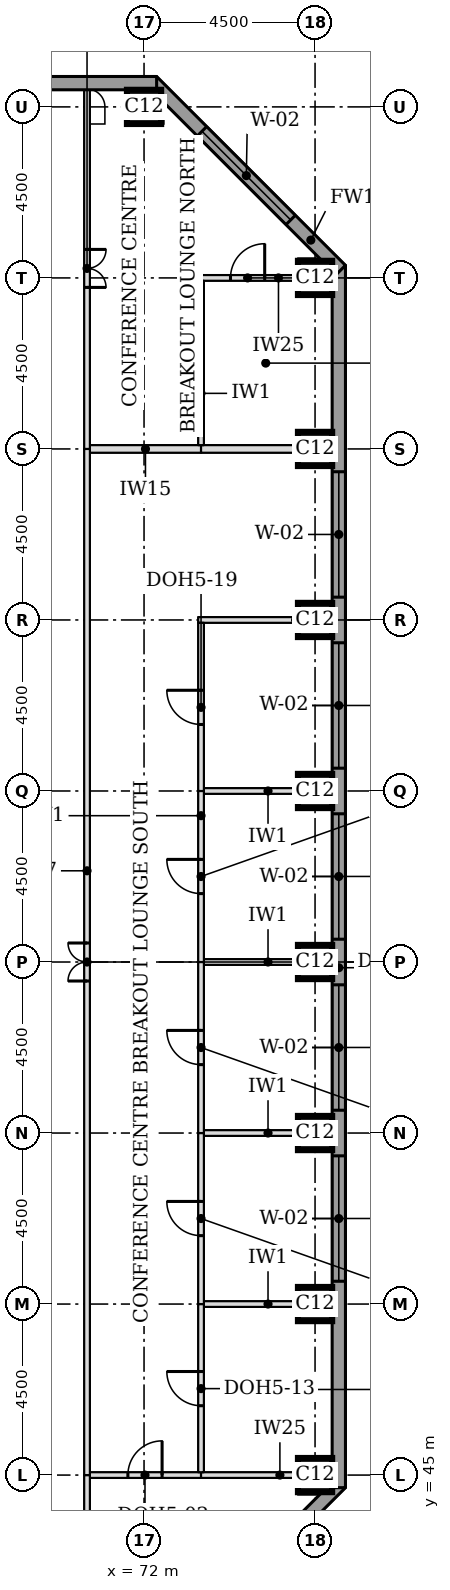
"""IFC4 building model, lengths in metres.
Left out: names, types, materials, properties, quantities, classifications, styles, units other than length and angle.
Written with IfcOpenShell. Run it as: python <this file> out.ifc"""

import sys

from ifc_helpers import new_model, si_unit, direction, frame, frame_2d, origin, origin_2d, place, context, subcontext, project, spatial, rectangle, extrude, element, fill, save


model = new_model("IFC4")
c1 = context("Model", 3, precision=1e-05, world=origin(), true_north=direction((0.0, 1.0)))
c2 = subcontext(c1, "Body", "Model", "MODEL_VIEW")
j1 = project(units=[si_unit("LENGTHUNIT", "METRE"), si_unit("PLANEANGLEUNIT", "RADIAN")], contexts=[c1])
p1 = place(None, origin())
s1 = spatial("IfcSite", under=j1, at=p1, CompositionType="ELEMENT")
p2 = place(p1, origin())
s2 = spatial("IfcBuilding", under=s1, at=p2, CompositionType="ELEMENT")
p3 = place(p2, frame((0.0, 0.0, 177.3)))
s3 = spatial("IfcBuildingStorey", under=s2, at=p3, CompositionType="ELEMENT", Elevation=177.3)
for number, where, z_axis, x_axis in (
    (1, (76.5, 45.0, 0.0), (0.0, 0.0, 1.0), (1.0, 0.0, 0.0)),
    (2, (76.5, 49.5, 0.0), (0.0, 0.0, 1.0), (1.0, 0.0, 0.0)),
    (3, (76.5, 54.0, 0.0), (0.0, 0.0, 1.0), (1.0, 0.0, 0.0)),
    (4, (76.5, 58.5, 0.0), (0.0, 0.0, 1.0), (1.0, 0.0, 0.0)),
    (5, (76.5, 63.0, 0.0), (0.0, 0.0, 1.0), (1.0, 0.0, 0.0)),
    (6, (76.5, 67.5, 0.0), (0.0, 0.0, 1.0), (1.0, 0.0, 0.0)),
    (7, (76.5, 72.0, 0.0), (0.0, 0.0, 1.0), (1.0, 0.0, 0.0)),
    (8, (76.5, 76.5, 0.0), (0.0, 0.0, 1.0), (1.0, 0.0, 0.0)),
    (9, (72.0, 81.0, 0.0), (0.0, 0.0, 1.0), (1.0, 0.0, 0.0)),
):
    element("IfcColumn", number, at=place(p3, frame(where, z_axis=z_axis, x_axis=x_axis)), inside=s3, PredefinedType="COLUMN", context=c2, shape_type="SweptSolid", body=[
        extrude(rectangle(XDim=0.9, YDim=0.9, at=origin_2d()), origin(), (0.0, 0.0, 1.0), 3.7),
    ])
p4 = place(p3, frame((72.208, 39.824, 0.0), z_axis=(0.0, 0.0, 1.0), x_axis=(0.707106781187, 0.707106781187, 0.0)))
e10 = element("IfcWall", 10, at=p4, inside=s3, PredefinedType="STANDARD", context=c2, shape_type="SweptSolid", body=[
    extrude(rectangle(XDim=7.027, YDim=0.35, at=frame_2d((3.513, 0.0))), origin(), (0.0, 0.0, 1.0), 3.525),
])
p5 = place(p4, frame((1.863, 0.0, 0.9)))
e11 = element("IfcOpeningElement", 11, at=p5, cuts=e10, PredefinedType="OPENING", context=c2, shape_type="SweptSolid", body=[
    extrude(rectangle(XDim=3.3, YDim=1.9, at=frame_2d((1.65, 0.95))), frame((0.0, 0.185, 0.0), z_axis=(0.0, -1.0, 0.0), x_axis=(1.0, 0.0, 0.0)), (0.0, 0.0, 1.0), 0.37),
])
p6 = place(p3, frame((77.125, 44.669, 0.0), z_axis=(0.0, 0.0, 1.0), x_axis=(0.0, 1.0, 0.0)))
e12 = element("IfcWall", 12, at=p6, inside=s3, PredefinedType="STANDARD", context=c2, shape_type="SweptSolid", body=[
    extrude(rectangle(XDim=32.163, YDim=0.35, at=frame_2d((16.081, 0.0))), origin(), (0.0, 0.0, 1.0), 3.525),
])
p7 = place(p6, frame((5.431, 0.0, 0.9)))
e13 = element("IfcOpeningElement", 13, at=p7, cuts=e12, PredefinedType="OPENING", context=c2, shape_type="SweptSolid", body=[
    extrude(rectangle(XDim=3.3, YDim=1.9, at=frame_2d((1.65, 0.95))), frame((0.0, 0.185, 0.0), z_axis=(0.0, -1.0, 0.0), x_axis=(1.0, 0.0, 0.0)), (0.0, 0.0, 1.0), 0.37),
])
p8 = place(p6, frame((9.931, 0.0, 0.9)))
e14 = element("IfcOpeningElement", 14, at=p8, cuts=e12, PredefinedType="OPENING", context=c2, shape_type="SweptSolid", body=[
    extrude(rectangle(XDim=3.3, YDim=1.9, at=frame_2d((1.65, 0.95))), frame((0.0, 0.185, 0.0), z_axis=(0.0, -1.0, 0.0), x_axis=(1.0, 0.0, 0.0)), (0.0, 0.0, 1.0), 0.37),
])
p9 = place(p6, frame((14.431, 0.0, 0.9)))
e15 = element("IfcOpeningElement", 15, at=p9, cuts=e12, PredefinedType="OPENING", context=c2, shape_type="SweptSolid", body=[
    extrude(rectangle(XDim=3.3, YDim=1.9, at=frame_2d((1.65, 0.95))), frame((0.0, 0.185, 0.0), z_axis=(0.0, -1.0, 0.0), x_axis=(1.0, 0.0, 0.0)), (0.0, 0.0, 1.0), 0.37),
])
p10 = place(p6, frame((18.931, 0.0, 0.9)))
e16 = element("IfcOpeningElement", 16, at=p10, cuts=e12, PredefinedType="OPENING", context=c2, shape_type="SweptSolid", body=[
    extrude(rectangle(XDim=3.3, YDim=1.9, at=frame_2d((1.65, 0.95))), frame((0.0, 0.185, 0.0), z_axis=(0.0, -1.0, 0.0), x_axis=(1.0, 0.0, 0.0)), (0.0, 0.0, 1.0), 0.37),
])
p11 = place(p6, frame((23.431, 0.0, 0.9)))
e17 = element("IfcOpeningElement", 17, at=p11, cuts=e12, PredefinedType="OPENING", context=c2, shape_type="SweptSolid", body=[
    extrude(rectangle(XDim=3.3, YDim=1.9, at=frame_2d((1.65, 0.95))), frame((0.0, 0.185, 0.0), z_axis=(0.0, -1.0, 0.0), x_axis=(1.0, 0.0, 0.0)), (0.0, 0.0, 1.0), 0.37),
])
p12 = place(p3, frame((77.176, 76.708, 0.0), z_axis=(0.0, 0.0, 1.0), x_axis=(-0.707106781187, 0.707106781187, 0.0)))
e18 = element("IfcWall", 18, at=p12, inside=s3, PredefinedType="STANDARD", context=c2, shape_type="SweptSolid", body=[
    extrude(rectangle(XDim=7.027, YDim=0.35, at=frame_2d((3.513, 0.0))), origin(), (0.0, 0.0, 1.0), 3.525),
])
p13 = place(p12, frame((1.863, 0.0, 0.9)))
e19 = element("IfcOpeningElement", 19, at=p13, cuts=e18, PredefinedType="OPENING", context=c2, shape_type="SweptSolid", body=[
    extrude(rectangle(XDim=3.3, YDim=1.9, at=frame_2d((1.65, 0.95))), frame((0.0, 0.185, 0.0), z_axis=(0.0, -1.0, 0.0), x_axis=(1.0, 0.0, 0.0)), (0.0, 0.0, 1.0), 0.37),
])
p14 = place(p3, frame((72.331, 81.625, 0.0), z_axis=(0.0, 0.0, 1.0), x_axis=(-1.0, 0.0, 0.0)))
e20 = element("IfcWall", 20, at=p14, inside=s3, PredefinedType="STANDARD", context=c2, shape_type="SweptSolid", body=[
    extrude(rectangle(XDim=32.163, YDim=0.35, at=frame_2d((16.081, 0.0))), origin(), (0.0, 0.0, 1.0), 3.525),
])
p15 = place(p14, frame((5.431, 0.0, 0.9)))
e21 = element("IfcOpeningElement", 21, at=p15, cuts=e20, PredefinedType="OPENING", context=c2, shape_type="SweptSolid", body=[
    extrude(rectangle(XDim=3.3, YDim=1.9, at=frame_2d((1.65, 0.95))), frame((0.0, 0.185, 0.0), z_axis=(0.0, -1.0, 0.0), x_axis=(1.0, 0.0, 0.0)), (0.0, 0.0, 1.0), 0.37),
])
p16 = place(p14, frame((9.931, 0.0, 0.9)))
e22 = element("IfcOpeningElement", 22, at=p16, cuts=e20, PredefinedType="OPENING", context=c2, shape_type="SweptSolid", body=[
    extrude(rectangle(XDim=3.3, YDim=1.9, at=frame_2d((1.65, 0.95))), frame((0.0, 0.185, 0.0), z_axis=(0.0, -1.0, 0.0), x_axis=(1.0, 0.0, 0.0)), (0.0, 0.0, 1.0), 0.37),
])
p17 = place(p14, frame((14.431, 0.0, 0.9)))
e23 = element("IfcOpeningElement", 23, at=p17, cuts=e20, PredefinedType="OPENING", context=c2, shape_type="SweptSolid", body=[
    extrude(rectangle(XDim=3.3, YDim=1.9, at=frame_2d((1.65, 0.95))), frame((0.0, 0.185, 0.0), z_axis=(0.0, -1.0, 0.0), x_axis=(1.0, 0.0, 0.0)), (0.0, 0.0, 1.0), 0.37),
])
p18 = place(p14, frame((18.931, 0.0, 0.9)))
e24 = element("IfcOpeningElement", 24, at=p18, cuts=e20, PredefinedType="OPENING", context=c2, shape_type="SweptSolid", body=[
    extrude(rectangle(XDim=3.3, YDim=1.9, at=frame_2d((1.65, 0.95))), frame((0.0, 0.185, 0.0), z_axis=(0.0, -1.0, 0.0), x_axis=(1.0, 0.0, 0.0)), (0.0, 0.0, 1.0), 0.37),
])
p19 = place(p14, frame((23.431, 0.0, 0.9)))
e25 = element("IfcOpeningElement", 25, at=p19, cuts=e20, PredefinedType="OPENING", context=c2, shape_type="SweptSolid", body=[
    extrude(rectangle(XDim=3.3, YDim=1.9, at=frame_2d((1.65, 0.95))), frame((0.0, 0.185, 0.0), z_axis=(0.0, -1.0, 0.0), x_axis=(1.0, 0.0, 0.0)), (0.0, 0.0, 1.0), 0.37),
])
p20 = place(p3, frame((70.575, 45.0, 0.0), z_axis=(0.0, 0.0, 1.0), x_axis=(1.0, 0.0, 0.0)))
e26 = element("IfcWall", 26, at=p20, inside=s3, PredefinedType="PARTITIONING", context=c2, shape_type="SweptSolid", body=[
    extrude(rectangle(XDim=2.925, YDim=0.15, at=frame_2d((1.462, 0.0))), origin(), (0.0, 0.0, 1.0), 3.096),
])
p21 = place(p20, frame((1.0, 0.0, 0.0)))
e27 = element("IfcOpeningElement", 27, at=p21, cuts=e26, PredefinedType="OPENING", context=c2, shape_type="SweptSolid", body=[
    extrude(rectangle(XDim=0.9, YDim=2.1, at=frame_2d((0.45, 1.05))), frame((0.0, 0.085, 0.0), z_axis=(0.0, -1.0, 0.0), x_axis=(1.0, 0.0, 0.0)), (0.0, 0.0, 1.0), 0.17),
])
p22 = place(p3, frame((73.5, 45.0, 0.0), z_axis=(0.0, 0.0, 1.0), x_axis=(1.0, 0.0, 0.0)))
e28 = element("IfcWall", 28, at=p22, inside=s3, PredefinedType="PARTITIONING", context=c2, shape_type="SweptSolid", body=[
    extrude(rectangle(XDim=2.55, YDim=0.15, at=frame_2d((1.275, 0.0))), origin(), (0.0, 0.0, 1.0), 3.096),
])
for number, where, z_axis, x_axis in (
    (29, (73.575, 49.5, 0.0), (0.0, 0.0, 1.0), (1.0, 0.0, 0.0)),
    (30, (73.575, 54.0, 0.0), (0.0, 0.0, 1.0), (1.0, 0.0, 0.0)),
    (31, (73.575, 58.5, 0.0), (0.0, 0.0, 1.0), (1.0, 0.0, 0.0)),
    (32, (73.575, 63.0, 0.0), (0.0, 0.0, 1.0), (1.0, 0.0, 0.0)),
):
    element("IfcWall", number, at=place(p3, frame(where, z_axis=z_axis, x_axis=x_axis)), inside=s3, PredefinedType="PARTITIONING", context=c2, shape_type="SweptSolid", body=[
        extrude(rectangle(XDim=3.375, YDim=0.15, at=frame_2d((1.688, 0.0))), origin(), (0.0, 0.0, 1.0), 3.55),
    ])
p23 = place(p3, frame((73.425, 67.5, 0.0), z_axis=(0.0, 0.0, 1.0), x_axis=(1.0, 0.0, 0.0)))
e33 = element("IfcWall", 33, at=p23, inside=s3, PredefinedType="PARTITIONING", context=c2, shape_type="SweptSolid", body=[
    extrude(rectangle(XDim=3.525, YDim=0.15, at=frame_2d((1.762, 0.0))), origin(), (0.0, 0.0, 1.0), 3.55),
])
p24 = place(p3, frame((70.575, 72.0, 0.0), z_axis=(0.0, 0.0, 1.0), x_axis=(1.0, 0.0, 0.0)))
e34 = element("IfcWall", 34, at=p24, inside=s3, PredefinedType="PARTITIONING", context=c2, shape_type="SweptSolid", body=[
    extrude(rectangle(XDim=2.925, YDim=0.2, at=frame_2d((1.462, 0.0))), origin(), (0.0, 0.0, 1.0), 3.55),
])
p25 = place(p3, frame((73.5, 72.0, 0.0), z_axis=(0.0, 0.0, 1.0), x_axis=(1.0, 0.0, 0.0)))
e35 = element("IfcWall", 35, at=p25, inside=s3, PredefinedType="PARTITIONING", context=c2, shape_type="SweptSolid", body=[
    extrude(rectangle(XDim=3.45, YDim=0.2, at=frame_2d((1.725, 0.0))), origin(), (0.0, 0.0, 1.0), 3.55),
])
p26 = place(p3, frame((73.425, 76.5, 0.0), z_axis=(0.0, 0.0, 1.0), x_axis=(1.0, 0.0, 0.0)))
e36 = element("IfcWall", 36, at=p26, inside=s3, PredefinedType="PARTITIONING", context=c2, shape_type="SweptSolid", body=[
    extrude(rectangle(XDim=2.625, YDim=0.15, at=frame_2d((1.312, 0.0))), origin(), (0.0, 0.0, 1.0), 3.096),
])
p27 = place(p26, frame((0.85, 0.0, 0.0)))
e37 = element("IfcOpeningElement", 37, at=p27, cuts=e36, PredefinedType="OPENING", context=c2, shape_type="SweptSolid", body=[
    extrude(rectangle(XDim=0.9, YDim=2.1, at=frame_2d((0.45, 1.05))), frame((0.0, 0.085, 0.0), z_axis=(0.0, -1.0, 0.0), x_axis=(1.0, 0.0, 0.0)), (0.0, 0.0, 1.0), 0.17),
])
p28 = place(p3, frame((70.5, 40.05, 0.0), z_axis=(0.0, 0.0, 1.0), x_axis=(0.0, 1.0, 0.0)))
e38 = element("IfcWall", 38, at=p28, inside=s3, PredefinedType="PARTITIONING", context=c2, shape_type="SweptSolid", body=[
    extrude(rectangle(XDim=4.95, YDim=0.15, at=frame_2d((2.475, 0.0))), origin(), (0.0, 0.0, 1.0), 3.55),
])
p29 = place(p3, frame((70.5, 45.0, 0.0), z_axis=(0.0, 0.0, 1.0), x_axis=(0.0, 1.0, 0.0)))
e39 = element("IfcWall", 39, at=p29, inside=s3, PredefinedType="PARTITIONING", context=c2, shape_type="SweptSolid", body=[
    extrude(rectangle(XDim=27.0, YDim=0.15, at=frame_2d((13.5, 0.0))), origin(), (0.0, 0.0, 1.0), 3.55),
])
p30 = place(p29, frame((13.0, 0.0, 0.0)))
e40 = element("IfcOpeningElement", 40, at=p30, cuts=e39, PredefinedType="OPENING", context=c2, shape_type="SweptSolid", body=[
    extrude(rectangle(XDim=1.0, YDim=2.1, at=frame_2d((0.5, 1.05))), frame((0.0, 0.085, 0.0), z_axis=(0.0, -1.0, 0.0), x_axis=(1.0, 0.0, 0.0)), (0.0, 0.0, 1.0), 0.17),
])
p31 = place(p3, frame((73.5, 45.075, 0.0), z_axis=(0.0, 0.0, 1.0), x_axis=(0.0, 1.0, 0.0)))
e41 = element("IfcWall", 41, at=p31, inside=s3, PredefinedType="PARTITIONING", context=c2, shape_type="SweptSolid", body=[
    extrude(rectangle(XDim=4.425, YDim=0.15, at=frame_2d((2.212, 0.0))), origin(), (0.0, 0.0, 1.0), 3.55),
])
p32 = place(p31, frame((1.75, 0.0, 0.0)))
e42 = element("IfcOpeningElement", 42, at=p32, cuts=e41, PredefinedType="OPENING", context=c2, shape_type="SweptSolid", body=[
    extrude(rectangle(XDim=0.9, YDim=2.1, at=frame_2d((0.45, 1.05))), frame((0.0, 0.085, 0.0), z_axis=(0.0, -1.0, 0.0), x_axis=(1.0, 0.0, 0.0)), (0.0, 0.0, 1.0), 0.17),
])
p33 = place(p3, frame((73.5, 49.5, 0.0), z_axis=(0.0, 0.0, 1.0), x_axis=(0.0, 1.0, 0.0)))
e43 = element("IfcWall", 43, at=p33, inside=s3, PredefinedType="PARTITIONING", context=c2, shape_type="SweptSolid", body=[
    extrude(rectangle(XDim=4.5, YDim=0.15, at=frame_2d((2.25, 0.0))), origin(), (0.0, 0.0, 1.0), 3.55),
])
p34 = place(p33, frame((1.8, 0.0, 0.0)))
e44 = element("IfcOpeningElement", 44, at=p34, cuts=e43, PredefinedType="OPENING", context=c2, shape_type="SweptSolid", body=[
    extrude(rectangle(XDim=0.9, YDim=2.1, at=frame_2d((0.45, 1.05))), frame((0.0, 0.085, 0.0), z_axis=(0.0, -1.0, 0.0), x_axis=(1.0, 0.0, 0.0)), (0.0, 0.0, 1.0), 0.17),
])
p35 = place(p3, frame((73.5, 54.0, 0.0), z_axis=(0.0, 0.0, 1.0), x_axis=(0.0, 1.0, 0.0)))
e45 = element("IfcWall", 45, at=p35, inside=s3, PredefinedType="PARTITIONING", context=c2, shape_type="SweptSolid", body=[
    extrude(rectangle(XDim=4.5, YDim=0.15, at=frame_2d((2.25, 0.0))), origin(), (0.0, 0.0, 1.0), 3.55),
])
p36 = place(p35, frame((1.8, 0.0, 0.0)))
e46 = element("IfcOpeningElement", 46, at=p36, cuts=e45, PredefinedType="OPENING", context=c2, shape_type="SweptSolid", body=[
    extrude(rectangle(XDim=0.9, YDim=2.1, at=frame_2d((0.45, 1.05))), frame((0.0, 0.085, 0.0), z_axis=(0.0, -1.0, 0.0), x_axis=(1.0, 0.0, 0.0)), (0.0, 0.0, 1.0), 0.17),
])
p37 = place(p3, frame((73.5, 58.5, 0.0), z_axis=(0.0, 0.0, 1.0), x_axis=(0.0, 1.0, 0.0)))
e47 = element("IfcWall", 47, at=p37, inside=s3, PredefinedType="PARTITIONING", context=c2, shape_type="SweptSolid", body=[
    extrude(rectangle(XDim=4.5, YDim=0.15, at=frame_2d((2.25, 0.0))), origin(), (0.0, 0.0, 1.0), 3.55),
])
p38 = place(p37, frame((1.8, 0.0, 0.0)))
e48 = element("IfcOpeningElement", 48, at=p38, cuts=e47, PredefinedType="OPENING", context=c2, shape_type="SweptSolid", body=[
    extrude(rectangle(XDim=0.9, YDim=2.1, at=frame_2d((0.45, 1.05))), frame((0.0, 0.085, 0.0), z_axis=(0.0, -1.0, 0.0), x_axis=(1.0, 0.0, 0.0)), (0.0, 0.0, 1.0), 0.17),
])
p39 = place(p3, frame((73.5, 63.0, 0.0), z_axis=(0.0, 0.0, 1.0), x_axis=(0.0, 1.0, 0.0)))
e49 = element("IfcWall", 49, at=p39, inside=s3, PredefinedType="PARTITIONING", context=c2, shape_type="SweptSolid", body=[
    extrude(rectangle(XDim=4.425, YDim=0.15, at=frame_2d((2.212, 0.0))), origin(), (0.0, 0.0, 1.0), 3.55),
])
p40 = place(p39, frame((1.75, 0.0, 0.0)))
e50 = element("IfcOpeningElement", 50, at=p40, cuts=e49, PredefinedType="OPENING", context=c2, shape_type="SweptSolid", body=[
    extrude(rectangle(XDim=0.9, YDim=2.1, at=frame_2d((0.45, 1.05))), frame((0.0, 0.085, 0.0), z_axis=(0.0, -1.0, 0.0), x_axis=(1.0, 0.0, 0.0)), (0.0, 0.0, 1.0), 0.17),
])
p41 = place(p3, frame((70.5, 72.0, 0.0), z_axis=(0.0, 0.0, 1.0), x_axis=(0.0, 1.0, 0.0)))
e51 = element("IfcWall", 51, at=p41, inside=s3, PredefinedType="PARTITIONING", context=c2, shape_type="SweptSolid", body=[
    extrude(rectangle(XDim=9.45, YDim=0.15, at=frame_2d((4.725, 0.0))), origin(), (0.0, 0.0, 1.0), 3.55),
])
p42 = place(p41, frame((4.25, 0.0, 0.0)))
e52 = element("IfcOpeningElement", 52, at=p42, cuts=e51, PredefinedType="OPENING", context=c2, shape_type="SweptSolid", body=[
    extrude(rectangle(XDim=1.0, YDim=2.1, at=frame_2d((0.5, 1.05))), frame((0.0, 0.085, 0.0), z_axis=(0.0, -1.0, 0.0), x_axis=(1.0, 0.0, 0.0)), (0.0, 0.0, 1.0), 0.17),
])
p43 = place(p3, frame((73.5, 72.1, 0.0), z_axis=(0.0, 0.0, 1.0), x_axis=(0.0, 1.0, 0.0)))
e53 = element("IfcWall", 53, at=p43, inside=s3, PredefinedType="PARTITIONING", context=c2, shape_type="SweptSolid", body=[
    extrude(rectangle(XDim=4.325, YDim=0.15, at=frame_2d((2.163, 0.0))), origin(), (0.0, 0.0, 1.0), 3.55),
])
p44 = place(p7, origin())
e54 = element("IfcWindow", 54, at=p44, inside=s3, PartitioningType="SINGLE_PANEL", PredefinedType="WINDOW", context=c2, shape_type="SweptSolid", body=[
    extrude(rectangle(XDim=3.3, YDim=1.9, at=frame_2d((1.65, 0.95))), frame((0.0, 0.085, 0.0), z_axis=(0.0, -1.0, 0.0), x_axis=(1.0, 0.0, 0.0)), (0.0, 0.0, 1.0), 0.06),
])
fill(e13, e54)
p45 = place(p8, origin())
e55 = element("IfcWindow", 55, at=p45, inside=s3, PartitioningType="SINGLE_PANEL", PredefinedType="WINDOW", context=c2, shape_type="SweptSolid", body=[
    extrude(rectangle(XDim=3.3, YDim=1.9, at=frame_2d((1.65, 0.95))), frame((0.0, 0.085, 0.0), z_axis=(0.0, -1.0, 0.0), x_axis=(1.0, 0.0, 0.0)), (0.0, 0.0, 1.0), 0.06),
])
fill(e14, e55)
p46 = place(p9, origin())
e56 = element("IfcWindow", 56, at=p46, inside=s3, PartitioningType="SINGLE_PANEL", PredefinedType="WINDOW", context=c2, shape_type="SweptSolid", body=[
    extrude(rectangle(XDim=3.3, YDim=1.9, at=frame_2d((1.65, 0.95))), frame((0.0, 0.085, 0.0), z_axis=(0.0, -1.0, 0.0), x_axis=(1.0, 0.0, 0.0)), (0.0, 0.0, 1.0), 0.06),
])
fill(e15, e56)
p47 = place(p10, origin())
e57 = element("IfcWindow", 57, at=p47, inside=s3, PartitioningType="SINGLE_PANEL", PredefinedType="WINDOW", context=c2, shape_type="SweptSolid", body=[
    extrude(rectangle(XDim=3.3, YDim=1.9, at=frame_2d((1.65, 0.95))), frame((0.0, 0.085, 0.0), z_axis=(0.0, -1.0, 0.0), x_axis=(1.0, 0.0, 0.0)), (0.0, 0.0, 1.0), 0.06),
])
fill(e16, e57)
p48 = place(p11, origin())
e58 = element("IfcWindow", 58, at=p48, inside=s3, PartitioningType="SINGLE_PANEL", PredefinedType="WINDOW", context=c2, shape_type="SweptSolid", body=[
    extrude(rectangle(XDim=3.3, YDim=1.9, at=frame_2d((1.65, 0.95))), frame((0.0, 0.085, 0.0), z_axis=(0.0, -1.0, 0.0), x_axis=(1.0, 0.0, 0.0)), (0.0, 0.0, 1.0), 0.06),
])
fill(e17, e58)
p49 = place(p13, origin())
e59 = element("IfcWindow", 59, at=p49, inside=s3, PartitioningType="SINGLE_PANEL", PredefinedType="WINDOW", context=c2, shape_type="SweptSolid", body=[
    extrude(rectangle(XDim=3.3, YDim=1.9, at=frame_2d((1.65, 0.95))), frame((0.0, 0.085, 0.0), z_axis=(0.0, -1.0, 0.0), x_axis=(1.0, 0.0, 0.0)), (0.0, 0.0, 1.0), 0.06),
])
fill(e19, e59)
p50 = place(p30, origin())
e60 = element("IfcDoor", 60, at=p50, inside=s3, OperationType="DOUBLE_DOOR_SINGLE_SWING", PredefinedType="DOOR", context=c2, shape_type="SweptSolid", body=[
    extrude(rectangle(XDim=1.0, YDim=2.1, at=frame_2d((0.5, 1.05))), frame((0.0, 0.025, 0.0), z_axis=(0.0, -1.0, 0.0), x_axis=(1.0, 0.0, 0.0)), (0.0, 0.0, 1.0), 0.05),
])
fill(e40, e60)
p51 = place(p21, origin())
e61 = element("IfcDoor", 61, at=p51, inside=s3, OperationType="SINGLE_SWING_RIGHT", PredefinedType="DOOR", context=c2, shape_type="SweptSolid", body=[
    extrude(rectangle(XDim=0.9, YDim=2.1, at=frame_2d((0.45, 1.05))), frame((0.0, 0.025, 0.0), z_axis=(0.0, -1.0, 0.0), x_axis=(1.0, 0.0, 0.0)), (0.0, 0.0, 1.0), 0.05),
])
fill(e27, e61)
p52 = place(p32, origin())
e62 = element("IfcDoor", 62, at=p52, inside=s3, OperationType="SINGLE_SWING_RIGHT", PredefinedType="DOOR", context=c2, shape_type="SweptSolid", body=[
    extrude(rectangle(XDim=0.9, YDim=2.1, at=frame_2d((0.45, 1.05))), frame((0.0, 0.025, 0.0), z_axis=(0.0, -1.0, 0.0), x_axis=(1.0, 0.0, 0.0)), (0.0, 0.0, 1.0), 0.05),
])
fill(e42, e62)
p53 = place(p34, origin())
e63 = element("IfcDoor", 63, at=p53, inside=s3, OperationType="SINGLE_SWING_RIGHT", PredefinedType="DOOR", context=c2, shape_type="SweptSolid", body=[
    extrude(rectangle(XDim=0.9, YDim=2.1, at=frame_2d((0.45, 1.05))), frame((0.0, 0.025, 0.0), z_axis=(0.0, -1.0, 0.0), x_axis=(1.0, 0.0, 0.0)), (0.0, 0.0, 1.0), 0.05),
])
fill(e44, e63)
p54 = place(p36, origin())
e64 = element("IfcDoor", 64, at=p54, inside=s3, OperationType="SINGLE_SWING_RIGHT", PredefinedType="DOOR", context=c2, shape_type="SweptSolid", body=[
    extrude(rectangle(XDim=0.9, YDim=2.1, at=frame_2d((0.45, 1.05))), frame((0.0, 0.025, 0.0), z_axis=(0.0, -1.0, 0.0), x_axis=(1.0, 0.0, 0.0)), (0.0, 0.0, 1.0), 0.05),
])
fill(e46, e64)
p55 = place(p38, origin())
e65 = element("IfcDoor", 65, at=p55, inside=s3, OperationType="SINGLE_SWING_RIGHT", PredefinedType="DOOR", context=c2, shape_type="SweptSolid", body=[
    extrude(rectangle(XDim=0.9, YDim=2.1, at=frame_2d((0.45, 1.05))), frame((0.0, 0.025, 0.0), z_axis=(0.0, -1.0, 0.0), x_axis=(1.0, 0.0, 0.0)), (0.0, 0.0, 1.0), 0.05),
])
fill(e48, e65)
p56 = place(p40, origin())
e66 = element("IfcDoor", 66, at=p56, inside=s3, OperationType="SINGLE_SWING_RIGHT", PredefinedType="DOOR", context=c2, shape_type="SweptSolid", body=[
    extrude(rectangle(XDim=0.9, YDim=2.1, at=frame_2d((0.45, 1.05))), frame((0.0, 0.025, 0.0), z_axis=(0.0, -1.0, 0.0), x_axis=(1.0, 0.0, 0.0)), (0.0, 0.0, 1.0), 0.05),
])
fill(e50, e66)
p57 = place(p42, frame((1.0, 0.0, 0.0), z_axis=(0.0, 0.0, 1.0), x_axis=(-1.0, 0.0, 0.0)))
e67 = element("IfcDoor", 67, at=p57, inside=s3, OperationType="DOUBLE_DOOR_SINGLE_SWING", PredefinedType="DOOR", context=c2, shape_type="SweptSolid", body=[
    extrude(rectangle(XDim=1.0, YDim=2.1, at=frame_2d((0.5, 1.05))), frame((0.0, 0.025, 0.0), z_axis=(0.0, -1.0, 0.0), x_axis=(1.0, 0.0, 0.0)), (0.0, 0.0, 1.0), 0.05),
])
fill(e52, e67)
p58 = place(p27, origin())
e68 = element("IfcDoor", 68, at=p58, inside=s3, OperationType="SINGLE_SWING_RIGHT", PredefinedType="DOOR", context=c2, shape_type="SweptSolid", body=[
    extrude(rectangle(XDim=0.9, YDim=2.1, at=frame_2d((0.45, 1.05))), frame((0.0, 0.025, 0.0), z_axis=(0.0, -1.0, 0.0), x_axis=(1.0, 0.0, 0.0)), (0.0, 0.0, 1.0), 0.05),
])
fill(e37, e68)
save(model, sys.argv[1])
